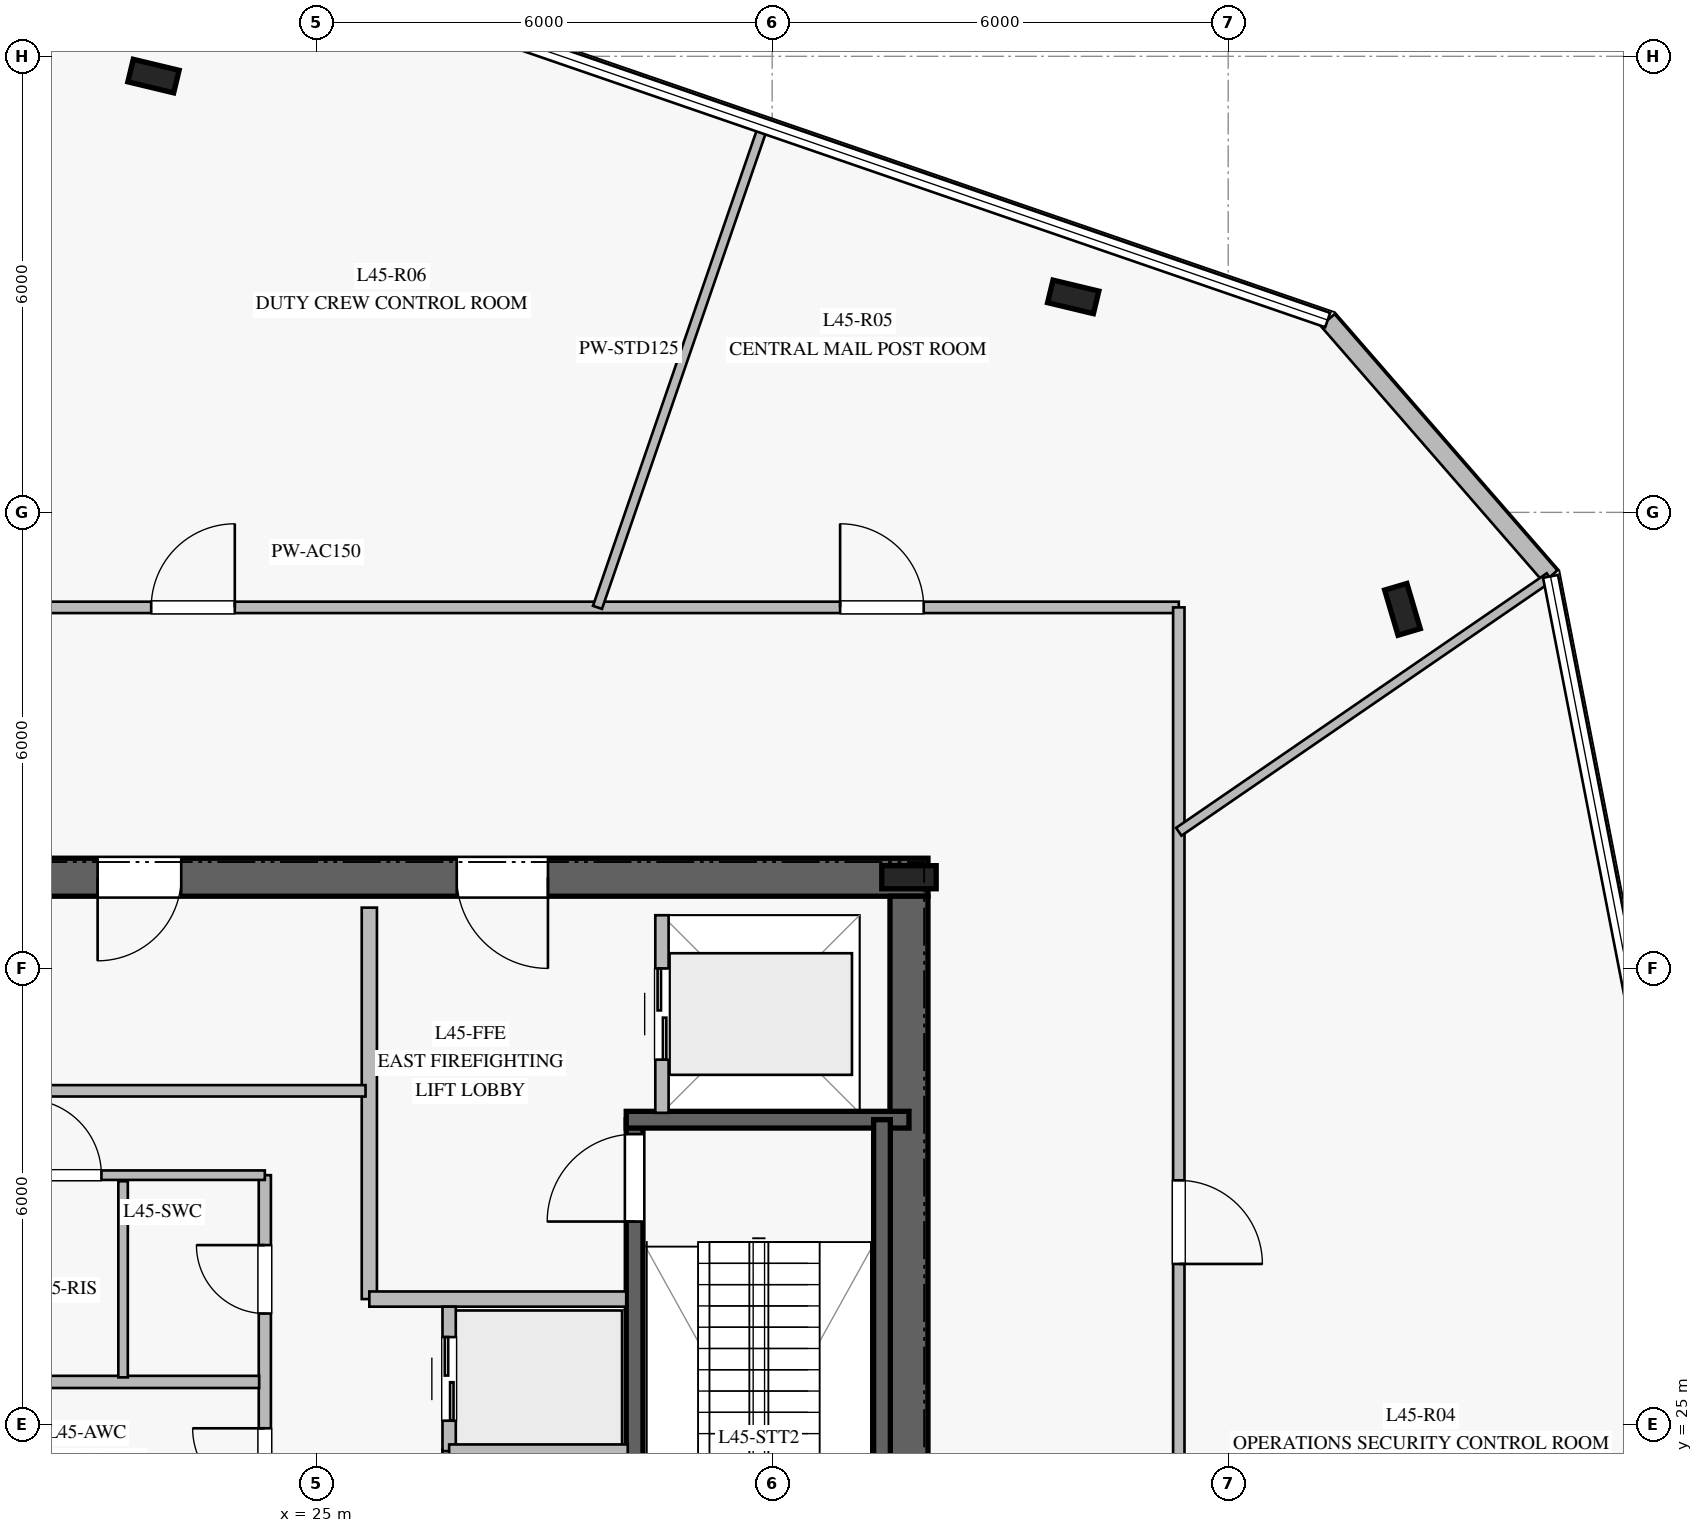
"""IFC4 building model, lengths in metres.
Left out: names, types, materials, properties, quantities, classifications, styles, units other than length and angle.
Written with IfcOpenShell. Run it as: python <this file> out.ifc"""

import sys

from ifc_helpers import new_model, si_unit, direction, frame, frame_2d, origin, origin_2d, place, context, subcontext, project, spatial, rectangle, i_section, extrude, element, fill, save


model = new_model("IFC4")
c1 = context("Model", 3, precision=1e-05, world=origin(), true_north=direction((0.0, 1.0)))
c2 = subcontext(c1, "Body", "Model", "MODEL_VIEW")
j1 = project(units=[si_unit("LENGTHUNIT", "METRE"), si_unit("PLANEANGLEUNIT", "RADIAN")], contexts=[c1])
p1 = place(None, origin())
s1 = spatial("IfcSite", under=j1, at=p1, CompositionType="ELEMENT")
p2 = place(p1, origin())
s2 = spatial("IfcBuilding", under=s1, at=p2, CompositionType="ELEMENT")
p3 = place(p2, frame((0.0, 0.0, 188.8)))
s3 = spatial("IfcBuildingStorey", under=s2, at=p3, CompositionType="ELEMENT", Elevation=188.8)
p4 = place(p3, frame((33.05, 32.2, 0.0), z_axis=(0.0, 0.0, 1.0), x_axis=(-1.0, 0.0, 0.0)))
e1 = element("IfcWall", 1, at=p4, inside=s3, PredefinedType="SHEAR", context=c2, shape_type="SweptSolid", body=[
    extrude(rectangle(XDim=16.1, YDim=0.5, at=frame_2d((8.05, 0.0))), origin(), (0.0, 0.0, 1.0), 3.78),
])
p5 = place(p4, frame((5.0, 0.0, 0.0)))
e2 = element("IfcOpeningElement", 2, at=p5, cuts=e1, PredefinedType="OPENING", context=c2, shape_type="SweptSolid", body=[
    extrude(rectangle(XDim=1.2, YDim=2.25, at=frame_2d((0.6, 1.125))), frame((0.0, 0.26, 0.0), z_axis=(0.0, -1.0, 0.0), x_axis=(1.0, 0.0, 0.0)), (0.0, 0.0, 1.0), 0.52),
])
p6 = place(p4, frame((9.825, 0.0, 0.0)))
e3 = element("IfcOpeningElement", 3, at=p6, cuts=e1, PredefinedType="OPENING", context=c2, shape_type="SweptSolid", body=[
    extrude(rectangle(XDim=1.1, YDim=2.2, at=frame_2d((0.55, 1.1))), frame((0.0, 0.26, 0.0), z_axis=(0.0, -1.0, 0.0), x_axis=(1.0, 0.0, 0.0)), (0.0, 0.0, 1.0), 0.52),
])
p7 = place(p3, frame((32.8, 18.05, 0.0), z_axis=(0.0, 0.0, 1.0), x_axis=(0.0, 1.0, 0.0)))
e4 = element("IfcWall", 4, at=p7, inside=s3, PredefinedType="SHEAR", context=c2, shape_type="SweptSolid", body=[
    extrude(rectangle(XDim=13.9, YDim=0.5, at=frame_2d((6.95, 0.0))), origin(), (0.0, 0.0, 1.0), 3.78),
])
p8 = place(p3, frame((32.8, 32.2, 0.0), z_axis=(0.0, 0.0, 1.0), x_axis=(1.0, 0.0, 0.0)))
e5 = element("IfcColumn", 5, at=p8, inside=s3, PredefinedType="COLUMN", context=c2, shape_type="SweptSolid", body=[
    extrude(i_section(OverallWidth=0.304, OverallDepth=0.716, WebThickness=0.021, FlangeThickness=0.04, at=origin_2d()), origin(), (0.0, 0.0, 1.0), 4.0),
])
p9 = place(p3, frame((29.19, 21.79, 0.0), z_axis=(0.0, 0.0, 1.0), x_axis=(0.0, 1.0, 0.0)))
e6 = element("IfcWall", 6, at=p9, inside=s3, PredefinedType="SOLIDWALL", context=c2, shape_type="SweptSolid", body=[
    extrude(rectangle(XDim=7.22, YDim=0.22, at=frame_2d((3.61, 0.0))), origin(), (0.0, 0.0, 1.0), 3.78),
])
p10 = place(p9, frame((5.88, 0.0, 0.0)))
e7 = element("IfcOpeningElement", 7, at=p10, cuts=e6, PredefinedType="OPENING", context=c2, shape_type="SweptSolid", body=[
    extrude(rectangle(XDim=1.15, YDim=2.2, at=frame_2d((0.575, 1.1))), frame((0.0, 0.12, 0.0), z_axis=(0.0, -1.0, 0.0), x_axis=(1.0, 0.0, 0.0)), (0.0, 0.0, 1.0), 0.24),
])
p11 = place(p3, frame((29.08, 29.01, 0.0), z_axis=(0.0, 0.0, 1.0), x_axis=(1.0, 0.0, 0.0)))
e8 = element("IfcWall", 8, at=p11, inside=s3, PredefinedType="SOLIDWALL", context=c2, shape_type="SweptSolid", body=[
    extrude(rectangle(XDim=3.72, YDim=0.22, at=frame_2d((1.86, 0.0))), origin(), (0.0, 0.0, 1.0), 3.78),
])
p12 = place(p3, frame((32.445, 29.01, 0.0), z_axis=(0.0, 0.0, 1.0), x_axis=(0.0, -1.0, 0.0)))
e9 = element("IfcWall", 9, at=p12, inside=s3, PredefinedType="SOLIDWALL", context=c2, shape_type="SweptSolid", body=[
    extrude(rectangle(XDim=7.22, YDim=0.22, at=frame_2d((3.61, 0.0))), origin(), (0.0, 0.0, 1.0), 3.78),
])
for number, where, z_axis, x_axis in (
    (10, (34.961, 39.835, 0.0), (0.0, 0.0, 1.0), (-0.972, 0.233, 0.0)),
    (11, (22.86, 42.74, 0.0), (0.0, 0.0, 1.0), (-0.972, 0.233, 0.0)),
    (12, (39.293, 35.724, 0.0), (0.0, 0.0, 1.0), (-0.284, 0.959, 0.0)),
):
    element("IfcColumn", number, at=place(p3, frame(where, z_axis=z_axis, x_axis=x_axis)), inside=s3, PredefinedType="COLUMN", context=c2, shape_type="SweptSolid", body=[
        extrude(i_section(OverallWidth=0.305, OverallDepth=0.62, WebThickness=0.021, FlangeThickness=0.04, at=origin_2d()), origin(), (0.0, 0.0, 1.0), 4.0),
    ])
p13 = place(p3, frame((41.241, 36.158, 0.0), z_axis=(0.0, 0.0, 1.0), x_axis=(-0.656134075049, 0.754644337128, 0.0)))
e13 = element("IfcWall", 13, at=p13, inside=s3, PredefinedType="STANDARD", context=c2, shape_type="SweptSolid", body=[
    extrude(rectangle(XDim=4.469, YDim=0.24, at=frame_2d((2.234, 0.0))), origin(), (0.0, 0.0, 1.0), 3.78),
])
p14 = place(p3, frame((25.7, 26.65, 0.0), z_axis=(0.0, 0.0, 1.0), x_axis=(0.0, 1.0, 0.0)))
e14 = element("IfcWall", 14, at=p14, inside=s3, PredefinedType="PARTITIONING", context=c2, shape_type="SweptSolid", body=[
    extrude(rectangle(XDim=5.15, YDim=0.2, at=frame_2d((2.575, 0.0))), origin(), (0.0, 0.0, 1.0), 3.78),
])
p15 = place(p3, frame((25.7, 26.65, 0.0), z_axis=(0.0, 0.0, 1.0), x_axis=(1.0, 0.0, 0.0)))
e15 = element("IfcWall", 15, at=p15, inside=s3, PredefinedType="PARTITIONING", context=c2, shape_type="SweptSolid", body=[
    extrude(rectangle(XDim=3.38, YDim=0.2, at=frame_2d((1.69, 0.0))), origin(), (0.0, 0.0, 1.0), 3.78),
])
p16 = place(p3, frame((24.325, 23.35, 0.0), z_axis=(0.0, 0.0, 1.0), x_axis=(0.0, 1.0, 0.0)))
e16 = element("IfcWall", 16, at=p16, inside=s3, PredefinedType="PLUMBINGWALL", context=c2, shape_type="SweptSolid", body=[
    extrude(rectangle(XDim=4.93, YDim=0.16, at=frame_2d((2.465, 0.0))), origin(), (0.0, 0.0, 1.0), 3.78),
])
p17 = place(p16, frame((0.65, 0.0, 0.0)))
e17 = element("IfcOpeningElement", 17, at=p17, cuts=e16, PredefinedType="OPENING", context=c2, shape_type="SweptSolid", body=[
    extrude(rectangle(XDim=0.95, YDim=2.1, at=frame_2d((0.475, 1.05))), frame((0.0, 0.09, 0.0), z_axis=(0.0, -1.0, 0.0), x_axis=(1.0, 0.0, 0.0)), (0.0, 0.0, 1.0), 0.18),
])
p18 = place(p16, frame((3.11, 0.0, 0.0)))
e18 = element("IfcOpeningElement", 18, at=p18, cuts=e16, PredefinedType="OPENING", context=c2, shape_type="SweptSolid", body=[
    extrude(rectangle(XDim=0.9, YDim=2.1, at=frame_2d((0.45, 1.05))), frame((0.0, 0.09, 0.0), z_axis=(0.0, -1.0, 0.0), x_axis=(1.0, 0.0, 0.0)), (0.0, 0.0, 1.0), 0.18),
])
p19 = place(p3, frame((20.92, 28.28, 0.0), z_axis=(0.0, 0.0, 1.0), x_axis=(1.0, 0.0, 0.0)))
e19 = element("IfcWall", 19, at=p19, inside=s3, PredefinedType="PARTITIONING", context=c2, shape_type="SweptSolid", body=[
    extrude(rectangle(XDim=3.405, YDim=0.125, at=frame_2d((1.703, 0.0))), origin(), (0.0, 0.0, 1.0), 3.78),
])
p20 = place(p19, frame((0.255, 0.0, 0.0)))
e20 = element("IfcOpeningElement", 20, at=p20, cuts=e19, PredefinedType="OPENING", context=c2, shape_type="SweptSolid", body=[
    extrude(rectangle(XDim=1.0, YDim=2.15, at=frame_2d((0.5, 1.075))), frame((0.0, 0.073, 0.0), z_axis=(0.0, -1.0, 0.0), x_axis=(1.0, 0.0, 0.0)), (0.0, 0.0, 1.0), 0.145),
])
p21 = place(p3, frame((20.95, 25.56, 0.0), z_axis=(0.0, 0.0, 1.0), x_axis=(1.0, 0.0, 0.0)))
e21 = element("IfcWall", 21, at=p21, inside=s3, PredefinedType="PLUMBINGWALL", context=c2, shape_type="SweptSolid", body=[
    extrude(rectangle(XDim=3.3, YDim=0.16, at=frame_2d((1.65, 0.0))), origin(), (0.0, 0.0, 1.0), 3.78),
])
p22 = place(p3, frame((22.46, 25.62, 0.0), z_axis=(0.0, 0.0, 1.0), x_axis=(0.0, 1.0, 0.0)))
e22 = element("IfcWall", 22, at=p22, inside=s3, PredefinedType="PARTITIONING", context=c2, shape_type="SweptSolid", body=[
    extrude(rectangle(XDim=2.58, YDim=0.125, at=frame_2d((1.29, 0.0))), origin(), (0.0, 0.0, 1.0), 3.78),
])
p23 = place(p3, frame((19.75, 29.39, 0.0), z_axis=(0.0, 0.0, 1.0), x_axis=(1.0, 0.0, 0.0)))
e23 = element("IfcWall", 23, at=p23, inside=s3, PredefinedType="PARTITIONING", context=c2, shape_type="SweptSolid", body=[
    extrude(rectangle(XDim=5.9, YDim=0.15, at=frame_2d((2.95, 0.0))), origin(), (0.0, 0.0, 1.0), 3.78),
])
p24 = place(p3, frame((26.75, 22.775, 0.0), z_axis=(0.0, 0.0, 1.0), x_axis=(0.0, 1.0, 0.0)))
e24 = element("IfcWall", 24, at=p24, inside=s3, PredefinedType="PARTITIONING", context=c2, shape_type="SweptSolid", body=[
    extrude(rectangle(XDim=1.9, YDim=0.175, at=frame_2d((0.95, 0.0))), origin(), (0.0, 0.0, 1.0), 3.78),
])
p25 = place(p24, frame((0.4, 0.0, 0.0)))
e25 = element("IfcOpeningElement", 25, at=p25, cuts=e24, PredefinedType="OPENING", context=c2, shape_type="SweptSolid", body=[
    extrude(rectangle(XDim=1.1, YDim=2.2, at=frame_2d((0.55, 1.1))), frame((0.0, 0.098, 0.0), z_axis=(0.0, -1.0, 0.0), x_axis=(1.0, 0.0, 0.0)), (0.0, 0.0, 1.0), 0.195),
])
p26 = place(p3, frame((26.75, 24.65, 0.0), z_axis=(0.0, 0.0, 1.0), x_axis=(0.0, 1.0, 0.0)))
e26 = element("IfcWall", 26, at=p26, inside=s3, PredefinedType="PARTITIONING", context=c2, shape_type="SweptSolid", body=[
    extrude(rectangle(XDim=1.9, YDim=0.175, at=frame_2d((0.95, 0.0))), origin(), (0.0, 0.0, 1.0), 3.78),
])
p27 = place(p26, frame((0.4, 0.0, 0.0)))
e27 = element("IfcOpeningElement", 27, at=p27, cuts=e26, PredefinedType="OPENING", context=c2, shape_type="SweptSolid", body=[
    extrude(rectangle(XDim=1.1, YDim=2.2, at=frame_2d((0.55, 1.1))), frame((0.0, 0.098, 0.0), z_axis=(0.0, -1.0, 0.0), x_axis=(1.0, 0.0, 0.0)), (0.0, 0.0, 1.0), 0.195),
])
p28 = place(p3, frame((26.75, 24.65, 0.0), z_axis=(0.0, 0.0, 1.0), x_axis=(1.0, 0.0, 0.0)))
e28 = element("IfcWall", 28, at=p28, inside=s3, PredefinedType="PARTITIONING", context=c2, shape_type="SweptSolid", body=[
    extrude(rectangle(XDim=2.35, YDim=0.175, at=frame_2d((1.175, 0.0))), origin(), (0.0, 0.0, 1.0), 3.78),
])
p29 = place(p3, frame((29.55, 29.1, 0.0), z_axis=(0.0, 0.0, 1.0), x_axis=(0.0, 1.0, 0.0)))
e29 = element("IfcWall", 29, at=p29, inside=s3, PredefinedType="PARTITIONING", context=c2, shape_type="SweptSolid", body=[
    extrude(rectangle(XDim=2.6, YDim=0.175, at=frame_2d((1.3, 0.0))), origin(), (0.0, 0.0, 1.0), 3.78),
])
p30 = place(p29, frame((0.7, 0.0, 0.0)))
e30 = element("IfcOpeningElement", 30, at=p30, cuts=e29, PredefinedType="OPENING", context=c2, shape_type="SweptSolid", body=[
    extrude(rectangle(XDim=1.2, YDim=2.2, at=frame_2d((0.6, 1.1))), frame((0.0, 0.098, 0.0), z_axis=(0.0, -1.0, 0.0), x_axis=(1.0, 0.0, 0.0)), (0.0, 0.0, 1.0), 0.195),
])
p31 = place(p3, frame((13.65, 35.75, 0.0), z_axis=(0.0, 0.0, 1.0), x_axis=(1.0, 0.0, 0.0)))
e31 = element("IfcWall", 31, at=p31, inside=s3, PredefinedType="PARTITIONING", context=c2, shape_type="SweptSolid", body=[
    extrude(rectangle(XDim=22.7, YDim=0.15, at=frame_2d((11.35, 0.0))), origin(), (0.0, 0.0, 1.0), 3.05),
])
p32 = place(p31, frame((18.244, 0.0, 0.0)))
e32 = element("IfcOpeningElement", 32, at=p32, cuts=e31, PredefinedType="OPENING", context=c2, shape_type="SweptSolid", body=[
    extrude(rectangle(XDim=1.1, YDim=2.2, at=frame_2d((0.55, 1.1))), frame((0.0, 0.085, 0.0), z_axis=(0.0, -1.0, 0.0), x_axis=(1.0, 0.0, 0.0)), (0.0, 0.0, 1.0), 0.17),
])
p33 = place(p31, frame((9.18, 0.0, 0.0)))
e33 = element("IfcOpeningElement", 33, at=p33, cuts=e31, PredefinedType="OPENING", context=c2, shape_type="SweptSolid", body=[
    extrude(rectangle(XDim=1.1, YDim=2.2, at=frame_2d((0.55, 1.1))), frame((0.0, 0.085, 0.0), z_axis=(0.0, -1.0, 0.0), x_axis=(1.0, 0.0, 0.0)), (0.0, 0.0, 1.0), 0.17),
])
p34 = place(p31, frame((1.913, 0.0, 0.0)))
e34 = element("IfcOpeningElement", 34, at=p34, cuts=e31, PredefinedType="OPENING", context=c2, shape_type="SweptSolid", body=[
    extrude(rectangle(XDim=1.1, YDim=2.2, at=frame_2d((0.55, 1.1))), frame((0.0, 0.085, 0.0), z_axis=(0.0, -1.0, 0.0), x_axis=(1.0, 0.0, 0.0)), (0.0, 0.0, 1.0), 0.17),
])
p35 = place(p3, frame((36.35, 35.75, 0.0), z_axis=(0.0, 0.0, 1.0), x_axis=(0.0, -1.0, 0.0)))
e35 = element("IfcWall", 35, at=p35, inside=s3, PredefinedType="PARTITIONING", context=c2, shape_type="SweptSolid", body=[
    extrude(rectangle(XDim=21.5, YDim=0.15, at=frame_2d((10.75, 0.0))), origin(), (0.0, 0.0, 1.0), 3.02),
])
p36 = place(p35, frame((16.657, 0.0, 0.0)))
e36 = element("IfcOpeningElement", 36, at=p36, cuts=e35, PredefinedType="OPENING", context=c2, shape_type="SweptSolid", body=[
    extrude(rectangle(XDim=1.1, YDim=2.2, at=frame_2d((0.55, 1.1))), frame((0.0, 0.085, 0.0), z_axis=(0.0, -1.0, 0.0), x_axis=(1.0, 0.0, 0.0)), (0.0, 0.0, 1.0), 0.17),
])
p37 = place(p35, frame((7.538, 0.0, 0.0)))
e37 = element("IfcOpeningElement", 37, at=p37, cuts=e35, PredefinedType="OPENING", context=c2, shape_type="SweptSolid", body=[
    extrude(rectangle(XDim=1.1, YDim=2.2, at=frame_2d((0.55, 1.1))), frame((0.0, 0.085, 0.0), z_axis=(0.0, -1.0, 0.0), x_axis=(1.0, 0.0, 0.0)), (0.0, 0.0, 1.0), 0.17),
])
p38 = place(p3, frame((28.702, 35.75, 0.0), z_axis=(0.0, 0.0, 1.0), x_axis=(0.325503304822, 0.945540902632, 0.0)))
e38 = element("IfcWall", 38, at=p38, inside=s3, PredefinedType="PARTITIONING", context=c2, shape_type="SweptSolid", body=[
    extrude(rectangle(XDim=6.685, YDim=0.125, at=frame_2d((3.343, 0.0))), origin(), (0.0, 0.0, 1.0), 3.05),
])
p39 = place(p3, frame((36.35, 32.798, 0.0), z_axis=(0.0, 0.0, 1.0), x_axis=(0.824306770306, 0.566143399173, 0.0)))
e39 = element("IfcWall", 39, at=p39, inside=s3, PredefinedType="PARTITIONING", context=c2, shape_type="SweptSolid", body=[
    extrude(rectangle(XDim=5.915, YDim=0.125, at=frame_2d((2.958, 0.0))), origin(), (0.0, 0.0, 1.0), 3.18),
])
p40 = place(p10, origin())
e40 = element("IfcDoor", 40, at=p40, inside=s3, OperationType="SINGLE_SWING_LEFT", PredefinedType="DOOR", context=c2, shape_type="SweptSolid", body=[
    extrude(rectangle(XDim=1.15, YDim=2.2, at=frame_2d((0.575, 1.1))), frame((0.0, 0.025, 0.0), z_axis=(0.0, -1.0, 0.0), x_axis=(1.0, 0.0, 0.0)), (0.0, 0.0, 1.0), 0.05),
])
fill(e7, e40)
p41 = place(p5, origin())
e41 = element("IfcDoor", 41, at=p41, inside=s3, OperationType="SINGLE_SWING_LEFT", PredefinedType="DOOR", context=c2, shape_type="SweptSolid", body=[
    extrude(rectangle(XDim=1.2, YDim=2.25, at=frame_2d((0.6, 1.125))), frame((0.0, 0.025, 0.0), z_axis=(0.0, -1.0, 0.0), x_axis=(1.0, 0.0, 0.0)), (0.0, 0.0, 1.0), 0.05),
])
fill(e2, e41)
p42 = place(p17, origin())
e42 = element("IfcDoor", 42, at=p42, inside=s3, OperationType="SINGLE_SWING_RIGHT", PredefinedType="DOOR", context=c2, shape_type="SweptSolid", body=[
    extrude(rectangle(XDim=0.95, YDim=2.1, at=frame_2d((0.475, 1.05))), frame((0.0, 0.025, 0.0), z_axis=(0.0, -1.0, 0.0), x_axis=(1.0, 0.0, 0.0)), (0.0, 0.0, 1.0), 0.05),
])
fill(e17, e42)
p43 = place(p20, origin())
e43 = element("IfcDoor", 43, at=p43, inside=s3, OperationType="SINGLE_SWING_LEFT", PredefinedType="DOOR", context=c2, shape_type="SweptSolid", body=[
    extrude(rectangle(XDim=1.0, YDim=2.15, at=frame_2d((0.5, 1.075))), frame((0.0, 0.025, 0.0), z_axis=(0.0, -1.0, 0.0), x_axis=(1.0, 0.0, 0.0)), (0.0, 0.0, 1.0), 0.05),
])
fill(e20, e43)
p44 = place(p18, origin())
e44 = element("IfcDoor", 44, at=p44, inside=s3, OperationType="SINGLE_SWING_RIGHT", PredefinedType="DOOR", context=c2, shape_type="SweptSolid", body=[
    extrude(rectangle(XDim=0.9, YDim=2.1, at=frame_2d((0.45, 1.05))), frame((0.0, 0.025, 0.0), z_axis=(0.0, -1.0, 0.0), x_axis=(1.0, 0.0, 0.0)), (0.0, 0.0, 1.0), 0.05),
])
fill(e18, e44)
p45 = place(p6, origin())
e45 = element("IfcDoor", 45, at=p45, inside=s3, OperationType="SINGLE_SWING_RIGHT", PredefinedType="DOOR", context=c2, shape_type="SweptSolid", body=[
    extrude(rectangle(XDim=1.1, YDim=2.2, at=frame_2d((0.55, 1.1))), frame((0.0, 0.025, 0.0), z_axis=(0.0, -1.0, 0.0), x_axis=(1.0, 0.0, 0.0)), (0.0, 0.0, 1.0), 0.05),
])
fill(e3, e45)
p46 = place(p27, origin())
e46 = element("IfcDoor", 46, at=p46, inside=s3, OperationType="DOUBLE_DOOR_SLIDING", PredefinedType="DOOR", context=c2, shape_type="SweptSolid", body=[
    extrude(rectangle(XDim=1.1, YDim=2.2, at=frame_2d((0.55, 1.1))), frame((0.0, 0.025, 0.0), z_axis=(0.0, -1.0, 0.0), x_axis=(1.0, 0.0, 0.0)), (0.0, 0.0, 1.0), 0.05),
])
fill(e27, e46)
p47 = place(p30, origin())
e47 = element("IfcDoor", 47, at=p47, inside=s3, OperationType="DOUBLE_DOOR_SLIDING", PredefinedType="DOOR", context=c2, shape_type="SweptSolid", body=[
    extrude(rectangle(XDim=1.2, YDim=2.2, at=frame_2d((0.6, 1.1))), frame((0.0, 0.025, 0.0), z_axis=(0.0, -1.0, 0.0), x_axis=(1.0, 0.0, 0.0)), (0.0, 0.0, 1.0), 0.05),
])
fill(e30, e47)
p48 = place(p37, origin())
e48 = element("IfcDoor", 48, at=p48, inside=s3, OperationType="SINGLE_SWING_RIGHT", PredefinedType="DOOR", context=c2, shape_type="SweptSolid", body=[
    extrude(rectangle(XDim=1.1, YDim=2.2, at=frame_2d((0.55, 1.1))), frame((0.0, 0.025, 0.0), z_axis=(0.0, -1.0, 0.0), x_axis=(1.0, 0.0, 0.0)), (0.0, 0.0, 1.0), 0.05),
])
fill(e37, e48)
p49 = place(p32, origin())
e49 = element("IfcDoor", 49, at=p49, inside=s3, OperationType="SINGLE_SWING_LEFT", PredefinedType="DOOR", context=c2, shape_type="SweptSolid", body=[
    extrude(rectangle(XDim=1.1, YDim=2.2, at=frame_2d((0.55, 1.1))), frame((0.0, 0.025, 0.0), z_axis=(0.0, -1.0, 0.0), x_axis=(1.0, 0.0, 0.0)), (0.0, 0.0, 1.0), 0.05),
])
fill(e32, e49)
p50 = place(p33, origin())
e50 = element("IfcDoor", 50, at=p50, inside=s3, OperationType="SINGLE_SWING_RIGHT", PredefinedType="DOOR", context=c2, shape_type="SweptSolid", body=[
    extrude(rectangle(XDim=1.1, YDim=2.2, at=frame_2d((0.55, 1.1))), frame((0.0, 0.025, 0.0), z_axis=(0.0, -1.0, 0.0), x_axis=(1.0, 0.0, 0.0)), (0.0, 0.0, 1.0), 0.05),
])
fill(e33, e50)
save(model, sys.argv[1])
